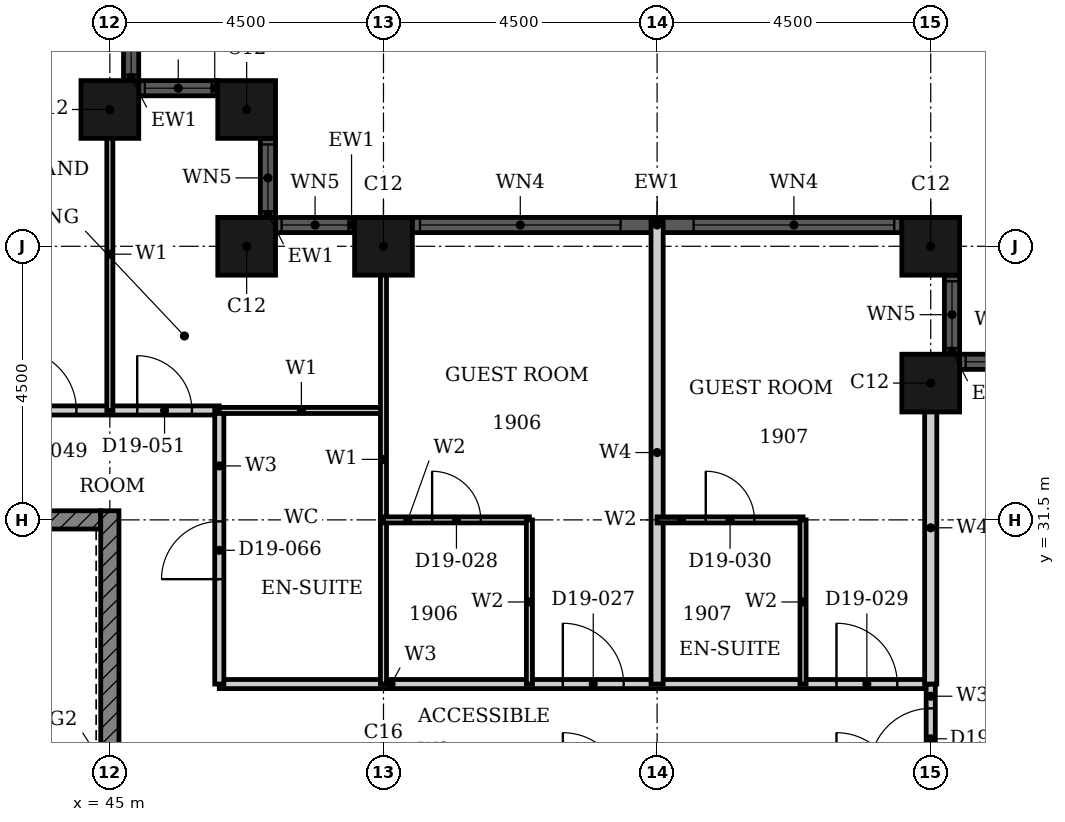
"""IFC4 building model, lengths in metres.
Left out: names, types, materials, properties, quantities, classifications, styles, units other than length and angle.
Written with IfcOpenShell. Run it as: python <this file> out.ifc"""

import sys

from ifc_helpers import new_model, si_unit, direction, frame, frame_2d, origin, origin_2d, place, context, subcontext, project, spatial, rectangle, hollow_rectangle, extrude, element, fill, save


model = new_model("IFC4")
c1 = context("Model", 3, precision=1e-05, world=origin(), true_north=direction((0.0, 1.0)))
c2 = subcontext(c1, "Body", "Model", "MODEL_VIEW")
j1 = project(units=[si_unit("LENGTHUNIT", "METRE"), si_unit("PLANEANGLEUNIT", "RADIAN")], contexts=[c1])
p1 = place(None, origin())
s1 = spatial("IfcSite", under=j1, at=p1, CompositionType="ELEMENT")
p2 = place(p1, origin())
s2 = spatial("IfcBuilding", under=s1, at=p2, CompositionType="ELEMENT")
p3 = place(p2, frame((0.0, 0.0, 81.6)))
s3 = spatial("IfcBuildingStorey", under=s2, at=p3, CompositionType="ELEMENT", Elevation=81.6)
for number, where, z_axis, x_axis in (
    (1, (58.5, 33.75, 0.0), (0.0, 0.0, 1.0), (1.0, 0.0, 0.0)),
    (2, (58.5, 36.0, 0.0), (0.0, 0.0, 1.0), (1.0, 0.0, 0.0)),
    (3, (49.5, 36.0, 0.0), (0.0, 0.0, 1.0), (1.0, 0.0, 0.0)),
    (4, (47.25, 36.0, 0.0), (0.0, 0.0, 1.0), (1.0, 0.0, 0.0)),
    (5, (47.25, 38.25, 0.0), (0.0, 0.0, 1.0), (1.0, 0.0, 0.0)),
    (6, (45.0, 38.25, 0.0), (0.0, 0.0, 1.0), (1.0, 0.0, 0.0)),
):
    element("IfcColumn", number, at=place(p3, frame(where, z_axis=z_axis, x_axis=x_axis)), inside=s3, PredefinedType="COLUMN", context=c2, shape_type="SweptSolid", body=[
        extrude(hollow_rectangle(XDim=0.95, YDim=0.95, WallThickness=0.03, at=origin_2d()), origin(), (0.0, 0.0, 1.0), 3.6),
    ])
p4 = place(p3, frame((60.275, 34.1, 0.0), z_axis=(0.0, 0.0, 1.0), x_axis=(-1.0, 0.0, 0.0)))
e7 = element("IfcWall", 7, at=p4, inside=s3, PredefinedType="SOLIDWALL", context=c2, shape_type="SweptSolid", body=[
    extrude(rectangle(XDim=1.3, YDim=0.25, at=frame_2d((0.65, 0.0))), origin(), (0.0, 0.0, 1.0), 3.6),
])
p5 = place(p4, frame((0.1, 0.0, 0.9)))
e8 = element("IfcOpeningElement", 8, at=p5, cuts=e7, PredefinedType="OPENING", context=c2, shape_type="SweptSolid", body=[
    extrude(rectangle(XDim=1.1, YDim=2.08, at=frame_2d((0.55, 1.04))), frame((0.0, 0.135, 0.0), z_axis=(0.0, -1.0, 0.0), x_axis=(1.0, 0.0, 0.0)), (0.0, 0.0, 1.0), 0.27),
])
p6 = place(p3, frame((58.85, 34.225, 0.0), z_axis=(0.0, 0.0, 1.0), x_axis=(0.0, 1.0, 0.0)))
e9 = element("IfcWall", 9, at=p6, inside=s3, PredefinedType="SOLIDWALL", context=c2, shape_type="SweptSolid", body=[
    extrude(rectangle(XDim=1.3, YDim=0.25, at=frame_2d((0.65, 0.0))), origin(), (0.0, 0.0, 1.0), 3.6),
])
p7 = place(p6, frame((0.1, 0.0, 0.9)))
e10 = element("IfcOpeningElement", 10, at=p7, cuts=e9, PredefinedType="OPENING", context=c2, shape_type="SweptSolid", body=[
    extrude(rectangle(XDim=1.1, YDim=2.08, at=frame_2d((0.55, 1.04))), frame((0.0, 0.135, 0.0), z_axis=(0.0, -1.0, 0.0), x_axis=(1.0, 0.0, 0.0)), (0.0, 0.0, 1.0), 0.27),
])
p8 = place(p3, frame((58.025, 36.35, 0.0), z_axis=(0.0, 0.0, 1.0), x_axis=(-1.0, 0.0, 0.0)))
e11 = element("IfcWall", 11, at=p8, inside=s3, PredefinedType="SOLIDWALL", context=c2, shape_type="SweptSolid", body=[
    extrude(rectangle(XDim=8.05, YDim=0.25, at=frame_2d((4.025, 0.0))), origin(), (0.0, 0.0, 1.0), 3.6),
])
p9 = place(p8, frame((0.125, 0.0, 0.9)))
e12 = element("IfcOpeningElement", 12, at=p9, cuts=e11, PredefinedType="OPENING", context=c2, shape_type="SweptSolid", body=[
    extrude(rectangle(XDim=3.3, YDim=2.08, at=frame_2d((1.65, 1.04))), frame((0.0, 0.135, 0.0), z_axis=(0.0, -1.0, 0.0), x_axis=(1.0, 0.0, 0.0)), (0.0, 0.0, 1.0), 0.27),
])
p10 = place(p8, frame((4.625, 0.0, 0.9)))
e13 = element("IfcOpeningElement", 13, at=p10, cuts=e11, PredefinedType="OPENING", context=c2, shape_type="SweptSolid", body=[
    extrude(rectangle(XDim=3.3, YDim=2.08, at=frame_2d((1.65, 1.04))), frame((0.0, 0.135, 0.0), z_axis=(0.0, -1.0, 0.0), x_axis=(1.0, 0.0, 0.0)), (0.0, 0.0, 1.0), 0.27),
])
p11 = place(p3, frame((49.025, 36.35, 0.0), z_axis=(0.0, 0.0, 1.0), x_axis=(-1.0, 0.0, 0.0)))
e14 = element("IfcWall", 14, at=p11, inside=s3, PredefinedType="SOLIDWALL", context=c2, shape_type="SweptSolid", body=[
    extrude(rectangle(XDim=1.3, YDim=0.25, at=frame_2d((0.65, 0.0))), origin(), (0.0, 0.0, 1.0), 3.6),
])
p12 = place(p11, frame((0.1, 0.0, 0.9)))
e15 = element("IfcOpeningElement", 15, at=p12, cuts=e14, PredefinedType="OPENING", context=c2, shape_type="SweptSolid", body=[
    extrude(rectangle(XDim=1.1, YDim=2.08, at=frame_2d((0.55, 1.04))), frame((0.0, 0.135, 0.0), z_axis=(0.0, -1.0, 0.0), x_axis=(1.0, 0.0, 0.0)), (0.0, 0.0, 1.0), 0.27),
])
p13 = place(p3, frame((47.6, 36.475, 0.0), z_axis=(0.0, 0.0, 1.0), x_axis=(0.0, 1.0, 0.0)))
e16 = element("IfcWall", 16, at=p13, inside=s3, PredefinedType="SOLIDWALL", context=c2, shape_type="SweptSolid", body=[
    extrude(rectangle(XDim=1.3, YDim=0.25, at=frame_2d((0.65, 0.0))), origin(), (0.0, 0.0, 1.0), 3.6),
])
p14 = place(p13, frame((0.1, 0.0, 0.9)))
e17 = element("IfcOpeningElement", 17, at=p14, cuts=e16, PredefinedType="OPENING", context=c2, shape_type="SweptSolid", body=[
    extrude(rectangle(XDim=1.1, YDim=2.08, at=frame_2d((0.55, 1.04))), frame((0.0, 0.135, 0.0), z_axis=(0.0, -1.0, 0.0), x_axis=(1.0, 0.0, 0.0)), (0.0, 0.0, 1.0), 0.27),
])
p15 = place(p3, frame((46.775, 38.6, 0.0), z_axis=(0.0, 0.0, 1.0), x_axis=(-1.0, 0.0, 0.0)))
e18 = element("IfcWall", 18, at=p15, inside=s3, PredefinedType="SOLIDWALL", context=c2, shape_type="SweptSolid", body=[
    extrude(rectangle(XDim=1.3, YDim=0.25, at=frame_2d((0.65, 0.0))), origin(), (0.0, 0.0, 1.0), 3.6),
])
p16 = place(p15, frame((0.1, 0.0, 0.9)))
e19 = element("IfcOpeningElement", 19, at=p16, cuts=e18, PredefinedType="OPENING", context=c2, shape_type="SweptSolid", body=[
    extrude(rectangle(XDim=1.1, YDim=2.08, at=frame_2d((0.55, 1.04))), frame((0.0, 0.135, 0.0), z_axis=(0.0, -1.0, 0.0), x_axis=(1.0, 0.0, 0.0)), (0.0, 0.0, 1.0), 0.27),
])
p17 = place(p3, frame((45.35, 38.725, 0.0), z_axis=(0.0, 0.0, 1.0), x_axis=(0.0, 1.0, 0.0)))
e20 = element("IfcWall", 20, at=p17, inside=s3, PredefinedType="SOLIDWALL", context=c2, shape_type="SweptSolid", body=[
    extrude(rectangle(XDim=1.3, YDim=0.25, at=frame_2d((0.65, 0.0))), origin(), (0.0, 0.0, 1.0), 3.6),
])
p18 = place(p17, frame((0.1, 0.0, 0.9)))
e21 = element("IfcOpeningElement", 21, at=p18, cuts=e20, PredefinedType="OPENING", context=c2, shape_type="SweptSolid", body=[
    extrude(rectangle(XDim=1.1, YDim=2.08, at=frame_2d((0.55, 1.04))), frame((0.0, 0.135, 0.0), z_axis=(0.0, -1.0, 0.0), x_axis=(1.0, 0.0, 0.0)), (0.0, 0.0, 1.0), 0.27),
])
p19 = place(p3, frame((40.625, 31.5, 0.0), z_axis=(0.0, 0.0, 1.0), x_axis=(1.0, 0.0, 0.0)))
e22 = element("IfcWall", 22, at=p19, inside=s3, PredefinedType="SHEAR", context=c2, shape_type="SweptSolid", body=[
    extrude(rectangle(XDim=4.225, YDim=0.3, at=frame_2d((2.113, 0.0))), origin(), (0.0, 0.0, 1.0), 3.3),
])
p20 = place(p3, frame((45.0, 22.35, 0.0), z_axis=(0.0, 0.0, 1.0), x_axis=(0.0, 1.0, 0.0)))
e23 = element("IfcWall", 23, at=p20, inside=s3, PredefinedType="SHEAR", context=c2, shape_type="SweptSolid", body=[
    extrude(rectangle(XDim=9.3, YDim=0.3, at=frame_2d((4.65, 0.0))), origin(), (0.0, 0.0, 1.0), 3.3),
])
p21 = place(p3, frame((46.8, 28.8, 0.0), z_axis=(0.0, 0.0, 1.0), x_axis=(1.0, 0.0, 0.0)))
e24 = element("IfcWall", 24, at=p21, inside=s3, PredefinedType="PARTITIONING", context=c2, shape_type="SweptSolid", body=[
    extrude(rectangle(XDim=11.7, YDim=0.15, at=frame_2d((5.85, 0.0))), origin(), (0.0, 0.0, 1.0), 3.3),
])
p22 = place(p21, frame((5.65, 0.0, 0.0)))
e25 = element("IfcOpeningElement", 25, at=p22, cuts=e24, PredefinedType="OPENING", context=c2, shape_type="SweptSolid", body=[
    extrude(rectangle(XDim=1.0, YDim=2.1, at=frame_2d((0.5, 1.05))), frame((0.0, 0.085, 0.0), z_axis=(0.0, -1.0, 0.0), x_axis=(1.0, 0.0, 0.0)), (0.0, 0.0, 1.0), 0.17),
])
p23 = place(p21, frame((10.15, 0.0, 0.0)))
e26 = element("IfcOpeningElement", 26, at=p23, cuts=e24, PredefinedType="OPENING", context=c2, shape_type="SweptSolid", body=[
    extrude(rectangle(XDim=1.0, YDim=2.1, at=frame_2d((0.5, 1.05))), frame((0.0, 0.085, 0.0), z_axis=(0.0, -1.0, 0.0), x_axis=(1.0, 0.0, 0.0)), (0.0, 0.0, 1.0), 0.17),
])
p24 = place(p3, frame((33.3, 33.3, 0.0), z_axis=(0.0, 0.0, 1.0), x_axis=(1.0, 0.0, 0.0)))
e27 = element("IfcWall", 27, at=p24, inside=s3, PredefinedType="PARTITIONING", context=c2, shape_type="SweptSolid", body=[
    extrude(rectangle(XDim=13.5, YDim=0.15, at=frame_2d((6.75, 0.0))), origin(), (0.0, 0.0, 1.0), 3.3),
])
p25 = place(p24, frame((10.15, 0.0, 0.0)))
e28 = element("IfcOpeningElement", 28, at=p25, cuts=e27, PredefinedType="OPENING", context=c2, shape_type="SweptSolid", body=[
    extrude(rectangle(XDim=1.0, YDim=2.1, at=frame_2d((0.5, 1.05))), frame((0.0, 0.085, 0.0), z_axis=(0.0, -1.0, 0.0), x_axis=(1.0, 0.0, 0.0)), (0.0, 0.0, 1.0), 0.17),
])
p26 = place(p24, frame((12.15, 0.0, 0.0)))
e29 = element("IfcOpeningElement", 29, at=p26, cuts=e27, PredefinedType="OPENING", context=c2, shape_type="SweptSolid", body=[
    extrude(rectangle(XDim=0.9, YDim=2.1, at=frame_2d((0.45, 1.05))), frame((0.0, 0.085, 0.0), z_axis=(0.0, -1.0, 0.0), x_axis=(1.0, 0.0, 0.0)), (0.0, 0.0, 1.0), 0.17),
])
p27 = place(p24, frame((3.15, 0.0, 0.0)))
e30 = element("IfcOpeningElement", 30, at=p27, cuts=e27, PredefinedType="OPENING", context=c2, shape_type="SweptSolid", body=[
    extrude(rectangle(XDim=0.9, YDim=2.1, at=frame_2d((0.45, 1.05))), frame((0.0, 0.085, 0.0), z_axis=(0.0, -1.0, 0.0), x_axis=(1.0, 0.0, 0.0)), (0.0, 0.0, 1.0), 0.17),
])
p28 = place(p3, frame((46.8, 28.8, 0.0), z_axis=(0.0, 0.0, 1.0), x_axis=(0.0, 1.0, 0.0)))
e31 = element("IfcWall", 31, at=p28, inside=s3, PredefinedType="PARTITIONING", context=c2, shape_type="SweptSolid", body=[
    extrude(rectangle(XDim=4.5, YDim=0.15, at=frame_2d((2.25, 0.0))), origin(), (0.0, 0.0, 1.0), 3.3),
])
p29 = place(p28, frame((1.725, 0.0, 0.0)))
e32 = element("IfcOpeningElement", 32, at=p29, cuts=e31, PredefinedType="OPENING", context=c2, shape_type="SweptSolid", body=[
    extrude(rectangle(XDim=0.95, YDim=2.1, at=frame_2d((0.475, 1.05))), frame((0.0, 0.085, 0.0), z_axis=(0.0, -1.0, 0.0), x_axis=(1.0, 0.0, 0.0)), (0.0, 0.0, 1.0), 0.17),
])
p30 = place(p3, frame((58.5, 27.0, 0.0), z_axis=(0.0, 0.0, 1.0), x_axis=(0.0, 1.0, 0.0)))
e33 = element("IfcWall", 33, at=p30, inside=s3, PredefinedType="PARTITIONING", context=c2, shape_type="SweptSolid", body=[
    extrude(rectangle(XDim=1.8, YDim=0.15, at=frame_2d((0.9, 0.0))), origin(), (0.0, 0.0, 1.0), 3.3),
])
p31 = place(p30, frame((0.4, 0.0, 0.0)))
e34 = element("IfcOpeningElement", 34, at=p31, cuts=e33, PredefinedType="OPENING", context=c2, shape_type="SweptSolid", body=[
    extrude(rectangle(XDim=1.0, YDim=2.1, at=frame_2d((0.5, 1.05))), frame((0.0, 0.085, 0.0), z_axis=(0.0, -1.0, 0.0), x_axis=(1.0, 0.0, 0.0)), (0.0, 0.0, 1.0), 0.17),
])
p32 = place(p3, frame((46.8, 33.3, 0.0), z_axis=(0.0, 0.0, 1.0), x_axis=(1.0, 0.0, 0.0)))
e35 = element("IfcWall", 35, at=p32, inside=s3, PredefinedType="PARTITIONING", context=c2, shape_type="SweptSolid", body=[
    extrude(rectangle(XDim=2.7, YDim=0.1, at=frame_2d((1.35, 0.0))), origin(), (0.0, 0.0, 1.0), 3.3),
])
p33 = place(p3, frame((45.0, 33.3, 0.0), z_axis=(0.0, 0.0, 1.0), x_axis=(0.0, 1.0, 0.0)))
e36 = element("IfcWall", 36, at=p33, inside=s3, PredefinedType="PARTITIONING", context=c2, shape_type="SweptSolid", body=[
    extrude(rectangle(XDim=5.14, YDim=0.1, at=frame_2d((2.57, 0.0))), origin(), (0.0, 0.0, 1.0), 3.3),
])
p34 = place(p3, frame((49.5, 28.8, 0.0), z_axis=(0.0, 0.0, 1.0), x_axis=(0.0, 1.0, 0.0)))
e37 = element("IfcWall", 37, at=p34, inside=s3, PredefinedType="PARTITIONING", context=c2, shape_type="SweptSolid", body=[
    extrude(rectangle(XDim=7.39, YDim=0.1, at=frame_2d((3.695, 0.0))), origin(), (0.0, 0.0, 1.0), 2.38),
])
p35 = place(p3, frame((54.0, 28.8, 0.0), z_axis=(0.0, 0.0, 1.0), x_axis=(0.0, 1.0, 0.0)))
e38 = element("IfcWall", 38, at=p35, inside=s3, PredefinedType="PARTITIONING", context=c2, shape_type="SweptSolid", body=[
    extrude(rectangle(XDim=7.615, YDim=0.2, at=frame_2d((3.808, 0.0))), origin(), (0.0, 0.0, 1.0), 3.3),
])
p36 = place(p3, frame((58.5, 28.8, 0.0), z_axis=(0.0, 0.0, 1.0), x_axis=(0.0, 1.0, 0.0)))
e39 = element("IfcWall", 39, at=p36, inside=s3, PredefinedType="PARTITIONING", context=c2, shape_type="SweptSolid", body=[
    extrude(rectangle(XDim=5.14, YDim=0.2, at=frame_2d((2.57, 0.0))), origin(), (0.0, 0.0, 1.0), 3.3),
])
p37 = place(p3, frame((49.5, 31.5, 0.0), z_axis=(0.0, 0.0, 1.0), x_axis=(1.0, 0.0, 0.0)))
e40 = element("IfcWall", 40, at=p37, inside=s3, PredefinedType="PARTITIONING", context=c2, shape_type="SweptSolid", body=[
    extrude(rectangle(XDim=2.4, YDim=0.1, at=frame_2d((1.2, 0.0))), origin(), (0.0, 0.0, 1.0), 2.58),
])
p38 = place(p37, frame((0.8, 0.0, 0.0)))
e41 = element("IfcOpeningElement", 41, at=p38, cuts=e40, PredefinedType="OPENING", context=c2, shape_type="SweptSolid", body=[
    extrude(rectangle(XDim=0.8, YDim=2.1, at=frame_2d((0.4, 1.05))), frame((0.0, 0.06, 0.0), z_axis=(0.0, -1.0, 0.0), x_axis=(1.0, 0.0, 0.0)), (0.0, 0.0, 1.0), 0.12),
])
p39 = place(p3, frame((54.0, 31.5, 0.0), z_axis=(0.0, 0.0, 1.0), x_axis=(1.0, 0.0, 0.0)))
e42 = element("IfcWall", 42, at=p39, inside=s3, PredefinedType="PARTITIONING", context=c2, shape_type="SweptSolid", body=[
    extrude(rectangle(XDim=2.4, YDim=0.1, at=frame_2d((1.2, 0.0))), origin(), (0.0, 0.0, 1.0), 2.58),
])
p40 = place(p39, frame((0.8, 0.0, 0.0)))
e43 = element("IfcOpeningElement", 43, at=p40, cuts=e42, PredefinedType="OPENING", context=c2, shape_type="SweptSolid", body=[
    extrude(rectangle(XDim=0.8, YDim=2.1, at=frame_2d((0.4, 1.05))), frame((0.0, 0.06, 0.0), z_axis=(0.0, -1.0, 0.0), x_axis=(1.0, 0.0, 0.0)), (0.0, 0.0, 1.0), 0.12),
])
for number, where, z_axis, x_axis in (
    (44, (51.9, 28.8, 0.0), (0.0, 0.0, 1.0), (0.0, 1.0, 0.0)),
    (45, (56.4, 28.8, 0.0), (0.0, 0.0, 1.0), (0.0, 1.0, 0.0)),
):
    element("IfcWall", number, at=place(p3, frame(where, z_axis=z_axis, x_axis=x_axis)), inside=s3, PredefinedType="PARTITIONING", context=c2, shape_type="SweptSolid", body=[
        extrude(rectangle(XDim=2.7, YDim=0.1, at=frame_2d((1.35, 0.0))), origin(), (0.0, 0.0, 1.0), 3.3),
    ])
p41 = place(p5, origin())
e46 = element("IfcWindow", 46, at=p41, inside=s3, PartitioningType="SINGLE_PANEL", PredefinedType="WINDOW", context=c2, shape_type="SweptSolid", body=[
    extrude(rectangle(XDim=1.1, YDim=2.08, at=frame_2d((0.55, 1.04))), frame((0.0, 0.03, 0.0), z_axis=(0.0, -1.0, 0.0), x_axis=(1.0, 0.0, 0.0)), (0.0, 0.0, 1.0), 0.06),
])
fill(e8, e46)
p42 = place(p7, origin())
e47 = element("IfcWindow", 47, at=p42, inside=s3, PartitioningType="SINGLE_PANEL", PredefinedType="WINDOW", context=c2, shape_type="SweptSolid", body=[
    extrude(rectangle(XDim=1.1, YDim=2.08, at=frame_2d((0.55, 1.04))), frame((0.0, 0.03, 0.0), z_axis=(0.0, -1.0, 0.0), x_axis=(1.0, 0.0, 0.0)), (0.0, 0.0, 1.0), 0.06),
])
fill(e10, e47)
p43 = place(p9, origin())
e48 = element("IfcWindow", 48, at=p43, inside=s3, PartitioningType="SINGLE_PANEL", PredefinedType="WINDOW", context=c2, shape_type="SweptSolid", body=[
    extrude(rectangle(XDim=3.3, YDim=2.08, at=frame_2d((1.65, 1.04))), frame((0.0, 0.03, 0.0), z_axis=(0.0, -1.0, 0.0), x_axis=(1.0, 0.0, 0.0)), (0.0, 0.0, 1.0), 0.06),
])
fill(e12, e48)
p44 = place(p10, origin())
e49 = element("IfcWindow", 49, at=p44, inside=s3, PartitioningType="SINGLE_PANEL", PredefinedType="WINDOW", context=c2, shape_type="SweptSolid", body=[
    extrude(rectangle(XDim=3.3, YDim=2.08, at=frame_2d((1.65, 1.04))), frame((0.0, 0.03, 0.0), z_axis=(0.0, -1.0, 0.0), x_axis=(1.0, 0.0, 0.0)), (0.0, 0.0, 1.0), 0.06),
])
fill(e13, e49)
p45 = place(p12, origin())
e50 = element("IfcWindow", 50, at=p45, inside=s3, PartitioningType="SINGLE_PANEL", PredefinedType="WINDOW", context=c2, shape_type="SweptSolid", body=[
    extrude(rectangle(XDim=1.1, YDim=2.08, at=frame_2d((0.55, 1.04))), frame((0.0, 0.03, 0.0), z_axis=(0.0, -1.0, 0.0), x_axis=(1.0, 0.0, 0.0)), (0.0, 0.0, 1.0), 0.06),
])
fill(e15, e50)
p46 = place(p14, origin())
e51 = element("IfcWindow", 51, at=p46, inside=s3, PartitioningType="SINGLE_PANEL", PredefinedType="WINDOW", context=c2, shape_type="SweptSolid", body=[
    extrude(rectangle(XDim=1.1, YDim=2.08, at=frame_2d((0.55, 1.04))), frame((0.0, 0.03, 0.0), z_axis=(0.0, -1.0, 0.0), x_axis=(1.0, 0.0, 0.0)), (0.0, 0.0, 1.0), 0.06),
])
fill(e17, e51)
p47 = place(p16, origin())
e52 = element("IfcWindow", 52, at=p47, inside=s3, PartitioningType="SINGLE_PANEL", PredefinedType="WINDOW", context=c2, shape_type="SweptSolid", body=[
    extrude(rectangle(XDim=1.1, YDim=2.08, at=frame_2d((0.55, 1.04))), frame((0.0, 0.03, 0.0), z_axis=(0.0, -1.0, 0.0), x_axis=(1.0, 0.0, 0.0)), (0.0, 0.0, 1.0), 0.06),
])
fill(e19, e52)
p48 = place(p18, origin())
e53 = element("IfcWindow", 53, at=p48, inside=s3, PartitioningType="SINGLE_PANEL", PredefinedType="WINDOW", context=c2, shape_type="SweptSolid", body=[
    extrude(rectangle(XDim=1.1, YDim=2.08, at=frame_2d((0.55, 1.04))), frame((0.0, 0.03, 0.0), z_axis=(0.0, -1.0, 0.0), x_axis=(1.0, 0.0, 0.0)), (0.0, 0.0, 1.0), 0.06),
])
fill(e21, e53)
p49 = place(p22, origin())
e54 = element("IfcDoor", 54, at=p49, inside=s3, OperationType="SINGLE_SWING_RIGHT", PredefinedType="DOOR", context=c2, shape_type="SweptSolid", body=[
    extrude(rectangle(XDim=1.0, YDim=2.1, at=frame_2d((0.5, 1.05))), frame((0.0, 0.025, 0.0), z_axis=(0.0, -1.0, 0.0), x_axis=(1.0, 0.0, 0.0)), (0.0, 0.0, 1.0), 0.05),
])
fill(e25, e54)
p50 = place(p38, origin())
e55 = element("IfcDoor", 55, at=p50, inside=s3, OperationType="SINGLE_SWING_LEFT", PredefinedType="DOOR", context=c2, shape_type="SweptSolid", body=[
    extrude(rectangle(XDim=0.8, YDim=2.1, at=frame_2d((0.4, 1.05))), frame((0.0, 0.025, 0.0), z_axis=(0.0, -1.0, 0.0), x_axis=(1.0, 0.0, 0.0)), (0.0, 0.0, 1.0), 0.05),
])
fill(e41, e55)
p51 = place(p23, origin())
e56 = element("IfcDoor", 56, at=p51, inside=s3, OperationType="SINGLE_SWING_RIGHT", PredefinedType="DOOR", context=c2, shape_type="SweptSolid", body=[
    extrude(rectangle(XDim=1.0, YDim=2.1, at=frame_2d((0.5, 1.05))), frame((0.0, 0.025, 0.0), z_axis=(0.0, -1.0, 0.0), x_axis=(1.0, 0.0, 0.0)), (0.0, 0.0, 1.0), 0.05),
])
fill(e26, e56)
p52 = place(p40, origin())
e57 = element("IfcDoor", 57, at=p52, inside=s3, OperationType="SINGLE_SWING_LEFT", PredefinedType="DOOR", context=c2, shape_type="SweptSolid", body=[
    extrude(rectangle(XDim=0.8, YDim=2.1, at=frame_2d((0.4, 1.05))), frame((0.0, 0.025, 0.0), z_axis=(0.0, -1.0, 0.0), x_axis=(1.0, 0.0, 0.0)), (0.0, 0.0, 1.0), 0.05),
])
fill(e43, e57)
p53 = place(p31, origin())
e58 = element("IfcDoor", 58, at=p53, inside=s3, OperationType="SINGLE_SWING_RIGHT", PredefinedType="DOOR", context=c2, shape_type="SweptSolid", body=[
    extrude(rectangle(XDim=1.0, YDim=2.1, at=frame_2d((0.5, 1.05))), frame((0.0, 0.025, 0.0), z_axis=(0.0, -1.0, 0.0), x_axis=(1.0, 0.0, 0.0)), (0.0, 0.0, 1.0), 0.05),
])
fill(e34, e58)
p54 = place(p25, origin())
e59 = element("IfcDoor", 59, at=p54, inside=s3, OperationType="SINGLE_SWING_RIGHT", PredefinedType="DOOR", context=c2, shape_type="SweptSolid", body=[
    extrude(rectangle(XDim=1.0, YDim=2.1, at=frame_2d((0.5, 1.05))), frame((0.0, 0.025, 0.0), z_axis=(0.0, -1.0, 0.0), x_axis=(1.0, 0.0, 0.0)), (0.0, 0.0, 1.0), 0.05),
])
fill(e28, e59)
p55 = place(p26, origin())
e60 = element("IfcDoor", 60, at=p55, inside=s3, OperationType="SINGLE_SWING_RIGHT", PredefinedType="DOOR", context=c2, shape_type="SweptSolid", body=[
    extrude(rectangle(XDim=0.9, YDim=2.1, at=frame_2d((0.45, 1.05))), frame((0.0, 0.025, 0.0), z_axis=(0.0, -1.0, 0.0), x_axis=(1.0, 0.0, 0.0)), (0.0, 0.0, 1.0), 0.05),
])
fill(e29, e60)
p56 = place(p29, origin())
e61 = element("IfcDoor", 61, at=p56, inside=s3, OperationType="SINGLE_SWING_RIGHT", PredefinedType="DOOR", context=c2, shape_type="SweptSolid", body=[
    extrude(rectangle(XDim=0.95, YDim=2.1, at=frame_2d((0.475, 1.05))), frame((0.0, 0.025, 0.0), z_axis=(0.0, -1.0, 0.0), x_axis=(1.0, 0.0, 0.0)), (0.0, 0.0, 1.0), 0.05),
])
fill(e32, e61)
save(model, sys.argv[1])
